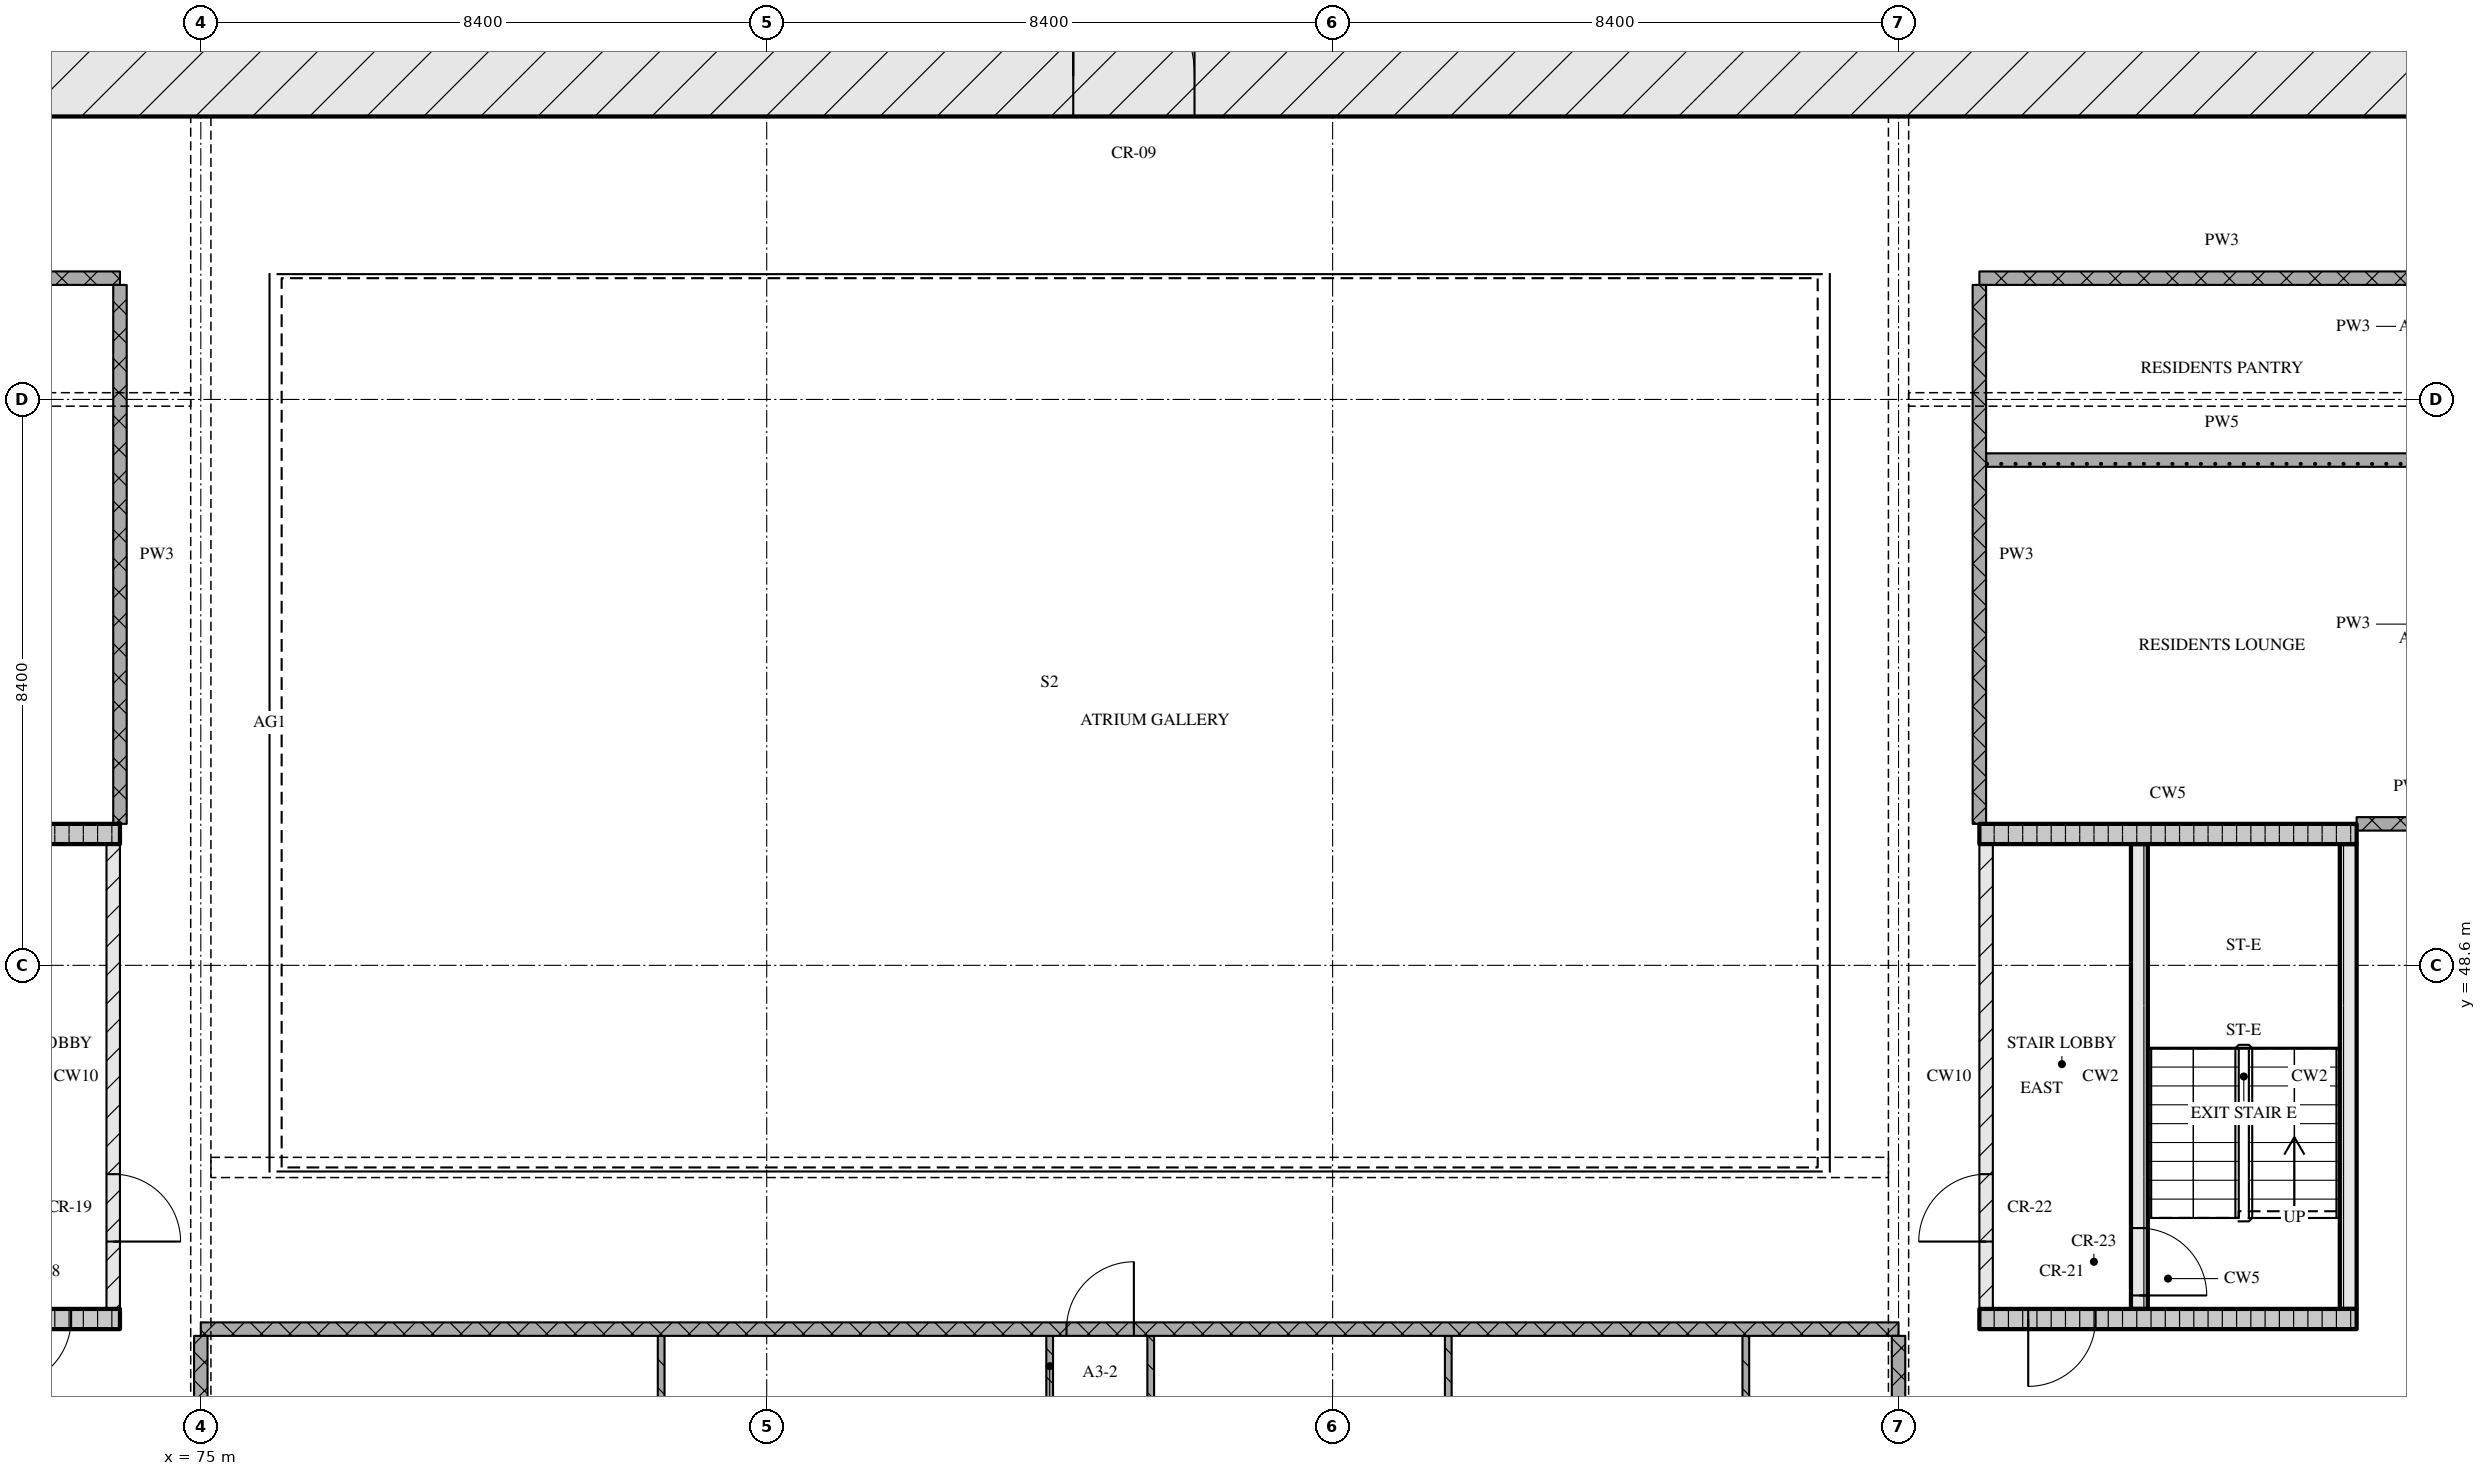
"""IFC4 building model, lengths in metres.
Left out: names, types, materials, properties, quantities, classifications, styles, units other than length and angle.
Written with IfcOpenShell. Run it as: python <this file> out.ifc"""

import sys

from ifc_helpers import new_model, si_unit, direction, frame, frame_2d, origin, place, context, subcontext, project, spatial, rectangle, extrude, element, fill, save


model = new_model("IFC4")
c1 = context("Model", 3, precision=1e-05, world=origin(), true_north=direction((0.0, 1.0)))
c2 = subcontext(c1, "Body", "Model", "MODEL_VIEW")
j1 = project(units=[si_unit("LENGTHUNIT", "METRE"), si_unit("PLANEANGLEUNIT", "RADIAN")], contexts=[c1])
p1 = place(None, origin())
s1 = spatial("IfcSite", under=j1, at=p1, CompositionType="ELEMENT")
p2 = place(p1, origin())
s2 = spatial("IfcBuilding", under=s1, at=p2, CompositionType="ELEMENT")
p3 = place(p2, frame((0.0, 0.0, 62.4)))
s3 = spatial("IfcBuildingStorey", under=s2, at=p3, CompositionType="ELEMENT", Elevation=62.4)
p4 = place(p3, frame((66.6, 61.8, 0.0), z_axis=(0.0, 0.0, 1.0), x_axis=(1.0, 0.0, 0.0)))
e1 = element("IfcWall", 1, at=p4, inside=s3, PredefinedType="SOLIDWALL", context=c2, shape_type="SweptSolid", body=[
    extrude(rectangle(XDim=42.0, YDim=1.2, at=frame_2d((21.0, 0.0))), origin(), (0.0, 0.0, 1.0), 3.32),
])
p5 = place(p4, frame((21.35, 0.0, 0.0)))
e2 = element("IfcOpeningElement", 2, at=p5, cuts=e1, PredefinedType="OPENING", context=c2, shape_type="SweptSolid", body=[
    extrude(rectangle(XDim=1.8, YDim=2.1, at=frame_2d((0.9, 1.05))), frame((0.0, 0.61, 0.0), z_axis=(0.0, -1.0, 0.0), x_axis=(1.0, 0.0, 0.0)), (0.0, 0.0, 1.0), 1.22),
])
p6 = place(p3, frame((68.2, 43.35, 0.0), z_axis=(0.0, 0.0, 1.0), x_axis=(1.0, 0.0, 0.0)))
e3 = element("IfcWall", 3, at=p6, inside=s3, PredefinedType="SOLIDWALL", context=c2, shape_type="SweptSolid", body=[
    extrude(rectangle(XDim=5.6, YDim=0.3, at=frame_2d((2.8, 0.0))), origin(), (0.0, 0.0, 1.0), 3.32),
])
p7 = place(p6, frame((3.875, 0.0, 0.0)))
e4 = element("IfcOpeningElement", 4, at=p7, cuts=e3, PredefinedType="OPENING", context=c2, shape_type="SweptSolid", body=[
    extrude(rectangle(XDim=1.0, YDim=2.1, at=frame_2d((0.5, 1.05))), frame((0.0, 0.16, 0.0), z_axis=(0.0, -1.0, 0.0), x_axis=(1.0, 0.0, 0.0)), (0.0, 0.0, 1.0), 0.32),
])
p8 = place(p3, frame((73.7, 43.5, 0.0), z_axis=(0.0, 0.0, 1.0), x_axis=(0.0, 1.0, 0.0)))
e5 = element("IfcWall", 5, at=p8, inside=s3, PredefinedType="PARTITIONING", context=c2, shape_type="SweptSolid", body=[
    extrude(rectangle(XDim=6.9, YDim=0.2, at=frame_2d((3.45, 0.0))), origin(), (0.0, 0.0, 1.0), 3.32),
])
p9 = place(p8, frame((1.0, 0.0, 0.0)))
e6 = element("IfcOpeningElement", 6, at=p9, cuts=e5, PredefinedType="OPENING", context=c2, shape_type="SweptSolid", body=[
    extrude(rectangle(XDim=1.0, YDim=2.1, at=frame_2d((0.5, 1.05))), frame((0.0, 0.11, 0.0), z_axis=(0.0, -1.0, 0.0), x_axis=(1.0, 0.0, 0.0)), (0.0, 0.0, 1.0), 0.22),
])
p10 = place(p3, frame((68.2, 50.55, 0.0), z_axis=(0.0, 0.0, 1.0), x_axis=(1.0, 0.0, 0.0)))
e7 = element("IfcWall", 7, at=p10, inside=s3, PredefinedType="SOLIDWALL", context=c2, shape_type="SweptSolid", body=[
    extrude(rectangle(XDim=5.6, YDim=0.3, at=frame_2d((2.8, 0.0))), origin(), (0.0, 0.0, 1.0), 3.32),
])
p11 = place(p3, frame((101.4, 43.35, 0.0), z_axis=(0.0, 0.0, 1.0), x_axis=(1.0, 0.0, 0.0)))
e8 = element("IfcWall", 8, at=p11, inside=s3, PredefinedType="SOLIDWALL", context=c2, shape_type="SweptSolid", body=[
    extrude(rectangle(XDim=5.6, YDim=0.3, at=frame_2d((2.8, 0.0))), origin(), (0.0, 0.0, 1.0), 3.32),
])
p12 = place(p11, frame((0.725, 0.0, 0.0)))
e9 = element("IfcOpeningElement", 9, at=p12, cuts=e8, PredefinedType="OPENING", context=c2, shape_type="SweptSolid", body=[
    extrude(rectangle(XDim=1.0, YDim=2.1, at=frame_2d((0.5, 1.05))), frame((0.0, 0.16, 0.0), z_axis=(0.0, -1.0, 0.0), x_axis=(1.0, 0.0, 0.0)), (0.0, 0.0, 1.0), 0.32),
])
p13 = place(p3, frame((101.5, 43.5, 0.0), z_axis=(0.0, 0.0, 1.0), x_axis=(0.0, 1.0, 0.0)))
e10 = element("IfcWall", 10, at=p13, inside=s3, PredefinedType="PARTITIONING", context=c2, shape_type="SweptSolid", body=[
    extrude(rectangle(XDim=6.9, YDim=0.2, at=frame_2d((3.45, 0.0))), origin(), (0.0, 0.0, 1.0), 3.32),
])
p14 = place(p13, frame((1.0, 0.0, 0.0)))
e11 = element("IfcOpeningElement", 11, at=p14, cuts=e10, PredefinedType="OPENING", context=c2, shape_type="SweptSolid", body=[
    extrude(rectangle(XDim=1.0, YDim=2.1, at=frame_2d((0.5, 1.05))), frame((0.0, 0.11, 0.0), z_axis=(0.0, -1.0, 0.0), x_axis=(1.0, 0.0, 0.0)), (0.0, 0.0, 1.0), 0.22),
])
p15 = place(p3, frame((103.775, 43.5, 0.0), z_axis=(0.0, 0.0, 1.0), x_axis=(0.0, 1.0, 0.0)))
e12 = element("IfcWall", 12, at=p15, inside=s3, PredefinedType="SOLIDWALL", context=c2, shape_type="SweptSolid", body=[
    extrude(rectangle(XDim=6.9, YDim=0.25, at=frame_2d((3.45, 0.0))), origin(), (0.0, 0.0, 1.0), 3.32),
])
p16 = place(p15, frame((0.2, 0.0, 0.0)))
e13 = element("IfcOpeningElement", 13, at=p16, cuts=e12, PredefinedType="OPENING", context=c2, shape_type="SweptSolid", body=[
    extrude(rectangle(XDim=1.0, YDim=2.1, at=frame_2d((0.5, 1.05))), frame((0.0, 0.135, 0.0), z_axis=(0.0, -1.0, 0.0), x_axis=(1.0, 0.0, 0.0)), (0.0, 0.0, 1.0), 0.27),
])
p17 = place(p3, frame((106.875, 43.5, 0.0), z_axis=(0.0, 0.0, 1.0), x_axis=(0.0, 1.0, 0.0)))
e14 = element("IfcWall", 14, at=p17, inside=s3, PredefinedType="SOLIDWALL", context=c2, shape_type="SweptSolid", body=[
    extrude(rectangle(XDim=6.9, YDim=0.25, at=frame_2d((3.45, 0.0))), origin(), (0.0, 0.0, 1.0), 3.32),
])
p18 = place(p3, frame((101.4, 50.55, 0.0), z_axis=(0.0, 0.0, 1.0), x_axis=(1.0, 0.0, 0.0)))
e15 = element("IfcWall", 15, at=p18, inside=s3, PredefinedType="SOLIDWALL", context=c2, shape_type="SweptSolid", body=[
    extrude(rectangle(XDim=5.6, YDim=0.3, at=frame_2d((2.8, 0.0))), origin(), (0.0, 0.0, 1.0), 3.32),
])
p19 = place(p3, frame((100.2, 43.2, 0.0), z_axis=(0.0, 0.0, 1.0), x_axis=(-1.0, 0.0, 0.0)))
e16 = element("IfcWall", 16, at=p19, inside=s3, PredefinedType="PARTITIONING", context=c2, shape_type="SweptSolid", body=[
    extrude(rectangle(XDim=25.2, YDim=0.2, at=frame_2d((12.6, 0.0))), origin(), (0.0, 0.0, 1.0), 3.32),
])
p20 = place(p19, frame((11.35, 0.0, 0.0)))
e17 = element("IfcOpeningElement", 17, at=p20, cuts=e16, PredefinedType="OPENING", context=c2, shape_type="SweptSolid", body=[
    extrude(rectangle(XDim=1.0, YDim=2.1, at=frame_2d((0.5, 1.05))), frame((0.0, 0.11, 0.0), z_axis=(0.0, -1.0, 0.0), x_axis=(1.0, 0.0, 0.0)), (0.0, 0.0, 1.0), 0.22),
])
p21 = place(p3, frame((107.0, 50.7, 0.0), z_axis=(0.0, 0.0, 1.0), x_axis=(1.0, 0.0, 0.0)))
e18 = element("IfcWall", 18, at=p21, inside=s3, PredefinedType="PARTITIONING", context=c2, shape_type="SweptSolid", body=[
    extrude(rectangle(XDim=1.6, YDim=0.2, at=frame_2d((0.8, 0.0))), origin(), (0.0, 0.0, 1.0), 3.32),
])
p22 = place(p3, frame((101.5, 56.1, 0.0), z_axis=(0.0, 0.0, 1.0), x_axis=(1.0, 0.0, 0.0)))
e19 = element("IfcWall", 19, at=p22, inside=s3, PredefinedType="PARTITIONING", context=c2, shape_type="SweptSolid", body=[
    extrude(rectangle(XDim=7.0, YDim=0.2, at=frame_2d((3.5, 0.0))), origin(), (0.0, 0.0, 1.0), 3.32),
])
p23 = place(p3, frame((73.8, 58.8, 0.0), z_axis=(0.0, 0.0, 1.0), x_axis=(-1.0, 0.0, 0.0)))
e20 = element("IfcWall", 20, at=p23, inside=s3, PredefinedType="PARTITIONING", context=c2, shape_type="SweptSolid", body=[
    extrude(rectangle(XDim=7.2, YDim=0.2, at=frame_2d((3.6, 0.0))), origin(), (0.0, 0.0, 1.0), 3.32),
])
p24 = place(p23, frame((3.0, 0.0, 0.0)))
e21 = element("IfcOpeningElement", 21, at=p24, cuts=e20, PredefinedType="OPENING", context=c2, shape_type="SweptSolid", body=[
    extrude(rectangle(XDim=1.2, YDim=2.1, at=frame_2d((0.6, 1.05))), frame((0.0, 0.11, 0.0), z_axis=(0.0, -1.0, 0.0), x_axis=(1.0, 0.0, 0.0)), (0.0, 0.0, 1.0), 0.22),
])
p25 = place(p3, frame((101.4, 58.8, 0.0), z_axis=(0.0, 0.0, 1.0), x_axis=(1.0, 0.0, 0.0)))
e22 = element("IfcWall", 22, at=p25, inside=s3, PredefinedType="PARTITIONING", context=c2, shape_type="SweptSolid", body=[
    extrude(rectangle(XDim=7.2, YDim=0.2, at=frame_2d((3.6, 0.0))), origin(), (0.0, 0.0, 1.0), 3.32),
])
p26 = place(p3, frame((73.8, 58.7, 0.0), z_axis=(0.0, 0.0, 1.0), x_axis=(0.0, -1.0, 0.0)))
e23 = element("IfcWall", 23, at=p26, inside=s3, PredefinedType="PARTITIONING", context=c2, shape_type="SweptSolid", body=[
    extrude(rectangle(XDim=8.0, YDim=0.2, at=frame_2d((4.0, 0.0))), origin(), (0.0, 0.0, 1.0), 3.32),
])
p27 = place(p3, frame((75.0, 43.1, 0.0), z_axis=(0.0, 0.0, 1.0), x_axis=(0.0, -1.0, 0.0)))
e24 = element("IfcWall", 24, at=p27, inside=s3, PredefinedType="PARTITIONING", context=c2, shape_type="SweptSolid", body=[
    extrude(rectangle(XDim=2.2, YDim=0.2, at=frame_2d((1.1, 0.0))), origin(), (0.0, 0.0, 1.0), 2.43),
])
p28 = place(p3, frame((81.833, 43.1, 0.0), z_axis=(0.0, 0.0, 1.0), x_axis=(0.0, -1.0, 0.0)))
e25 = element("IfcWall", 25, at=p28, inside=s3, PredefinedType="PARTITIONING", context=c2, shape_type="SweptSolid", body=[
    extrude(rectangle(XDim=5.85, YDim=0.1, at=frame_2d((2.925, 0.0))), origin(), (0.0, 0.0, 1.0), 3.32),
])
p29 = place(p3, frame((87.6, 37.25, 0.0), z_axis=(0.0, 0.0, 1.0), x_axis=(0.0, 1.0, 0.0)))
e26 = element("IfcWall", 26, at=p29, inside=s3, PredefinedType="PARTITIONING", context=c2, shape_type="SweptSolid", body=[
    extrude(rectangle(XDim=5.85, YDim=0.1, at=frame_2d((2.925, 0.0))), origin(), (0.0, 0.0, 1.0), 3.32),
])
p30 = place(p29, frame((2.5, 0.0, 0.0)))
e27 = element("IfcOpeningElement", 27, at=p30, cuts=e26, PredefinedType="OPENING", context=c2, shape_type="SweptSolid", body=[
    extrude(rectangle(XDim=0.9, YDim=2.1, at=frame_2d((0.45, 1.05))), frame((0.0, 0.06, 0.0), z_axis=(0.0, -1.0, 0.0), x_axis=(1.0, 0.0, 0.0)), (0.0, 0.0, 1.0), 0.12),
])
p31 = place(p3, frame((89.1, 43.1, 0.0), z_axis=(0.0, 0.0, 1.0), x_axis=(0.0, -1.0, 0.0)))
e28 = element("IfcWall", 28, at=p31, inside=s3, PredefinedType="PARTITIONING", context=c2, shape_type="SweptSolid", body=[
    extrude(rectangle(XDim=5.85, YDim=0.1, at=frame_2d((2.925, 0.0))), origin(), (0.0, 0.0, 1.0), 3.32),
])
p32 = place(p31, frame((2.5, 0.0, 0.0)))
e29 = element("IfcOpeningElement", 29, at=p32, cuts=e28, PredefinedType="OPENING", context=c2, shape_type="SweptSolid", body=[
    extrude(rectangle(XDim=0.8, YDim=2.1, at=frame_2d((0.4, 1.05))), frame((0.0, 0.06, 0.0), z_axis=(0.0, -1.0, 0.0), x_axis=(1.0, 0.0, 0.0)), (0.0, 0.0, 1.0), 0.12),
])
for number, where, z_axis, x_axis in (
    (30, (93.517, 43.1, 0.0), (0.0, 0.0, 1.0), (0.0, -1.0, 0.0)),
    (31, (97.933, 43.1, 0.0), (0.0, 0.0, 1.0), (0.0, -1.0, 0.0)),
):
    element("IfcWall", number, at=place(p3, frame(where, z_axis=z_axis, x_axis=x_axis)), inside=s3, PredefinedType="PARTITIONING", context=c2, shape_type="SweptSolid", body=[
        extrude(rectangle(XDim=5.85, YDim=0.1, at=frame_2d((2.925, 0.0))), origin(), (0.0, 0.0, 1.0), 3.32),
    ])
p33 = place(p3, frame((100.2, 43.1, 0.0), z_axis=(0.0, 0.0, 1.0), x_axis=(0.0, -1.0, 0.0)))
e32 = element("IfcWall", 32, at=p33, inside=s3, PredefinedType="PARTITIONING", context=c2, shape_type="SweptSolid", body=[
    extrude(rectangle(XDim=2.2, YDim=0.2, at=frame_2d((1.1, 0.0))), origin(), (0.0, 0.0, 1.0), 2.43),
])
p34 = place(p3, frame((101.4, 58.7, 0.0), z_axis=(0.0, 0.0, 1.0), x_axis=(0.0, -1.0, 0.0)))
e33 = element("IfcWall", 33, at=p34, inside=s3, PredefinedType="PARTITIONING", context=c2, shape_type="SweptSolid", body=[
    extrude(rectangle(XDim=8.0, YDim=0.2, at=frame_2d((4.0, 0.0))), origin(), (0.0, 0.0, 1.0), 3.32),
])
p35 = place(p5, origin())
e34 = element("IfcDoor", 34, at=p35, inside=s3, OperationType="DOUBLE_DOOR_SINGLE_SWING", PredefinedType="DOOR", context=c2, shape_type="SweptSolid", body=[
    extrude(rectangle(XDim=1.8, YDim=2.1, at=frame_2d((0.9, 1.05))), frame((0.0, 0.025, 0.0), z_axis=(0.0, -1.0, 0.0), x_axis=(1.0, 0.0, 0.0)), (0.0, 0.0, 1.0), 0.05),
])
fill(e2, e34)
p36 = place(p7, origin())
e35 = element("IfcDoor", 35, at=p36, inside=s3, OperationType="SINGLE_SWING_RIGHT", PredefinedType="DOOR", context=c2, shape_type="SweptSolid", body=[
    extrude(rectangle(XDim=1.0, YDim=2.1, at=frame_2d((0.5, 1.05))), frame((0.0, 0.025, 0.0), z_axis=(0.0, -1.0, 0.0), x_axis=(1.0, 0.0, 0.0)), (0.0, 0.0, 1.0), 0.05),
])
fill(e4, e35)
p37 = place(p9, origin())
e36 = element("IfcDoor", 36, at=p37, inside=s3, OperationType="SINGLE_SWING_RIGHT", PredefinedType="DOOR", context=c2, shape_type="SweptSolid", body=[
    extrude(rectangle(XDim=1.0, YDim=2.1, at=frame_2d((0.5, 1.05))), frame((0.0, 0.025, 0.0), z_axis=(0.0, -1.0, 0.0), x_axis=(1.0, 0.0, 0.0)), (0.0, 0.0, 1.0), 0.05),
])
fill(e6, e36)
p38 = place(p12, origin())
e37 = element("IfcDoor", 37, at=p38, inside=s3, OperationType="SINGLE_SWING_RIGHT", PredefinedType="DOOR", context=c2, shape_type="SweptSolid", body=[
    extrude(rectangle(XDim=1.0, YDim=2.1, at=frame_2d((0.5, 1.05))), frame((0.0, 0.025, 0.0), z_axis=(0.0, -1.0, 0.0), x_axis=(1.0, 0.0, 0.0)), (0.0, 0.0, 1.0), 0.05),
])
fill(e9, e37)
p39 = place(p16, origin())
e38 = element("IfcDoor", 38, at=p39, inside=s3, OperationType="SINGLE_SWING_RIGHT", PredefinedType="DOOR", context=c2, shape_type="SweptSolid", body=[
    extrude(rectangle(XDim=1.0, YDim=2.1, at=frame_2d((0.5, 1.05))), frame((0.0, 0.025, 0.0), z_axis=(0.0, -1.0, 0.0), x_axis=(1.0, 0.0, 0.0)), (0.0, 0.0, 1.0), 0.05),
])
fill(e13, e38)
p40 = place(p14, origin())
e39 = element("IfcDoor", 39, at=p40, inside=s3, OperationType="SINGLE_SWING_LEFT", PredefinedType="DOOR", context=c2, shape_type="SweptSolid", body=[
    extrude(rectangle(XDim=1.0, YDim=2.1, at=frame_2d((0.5, 1.05))), frame((0.0, 0.025, 0.0), z_axis=(0.0, -1.0, 0.0), x_axis=(1.0, 0.0, 0.0)), (0.0, 0.0, 1.0), 0.05),
])
fill(e11, e39)
p41 = place(p20, origin())
e40 = element("IfcDoor", 40, at=p41, inside=s3, OperationType="SINGLE_SWING_RIGHT", PredefinedType="DOOR", context=c2, shape_type="SweptSolid", body=[
    extrude(rectangle(XDim=1.0, YDim=2.1, at=frame_2d((0.5, 1.05))), frame((0.0, 0.025, 0.0), z_axis=(0.0, -1.0, 0.0), x_axis=(1.0, 0.0, 0.0)), (0.0, 0.0, 1.0), 0.05),
])
fill(e17, e40)
save(model, sys.argv[1])
